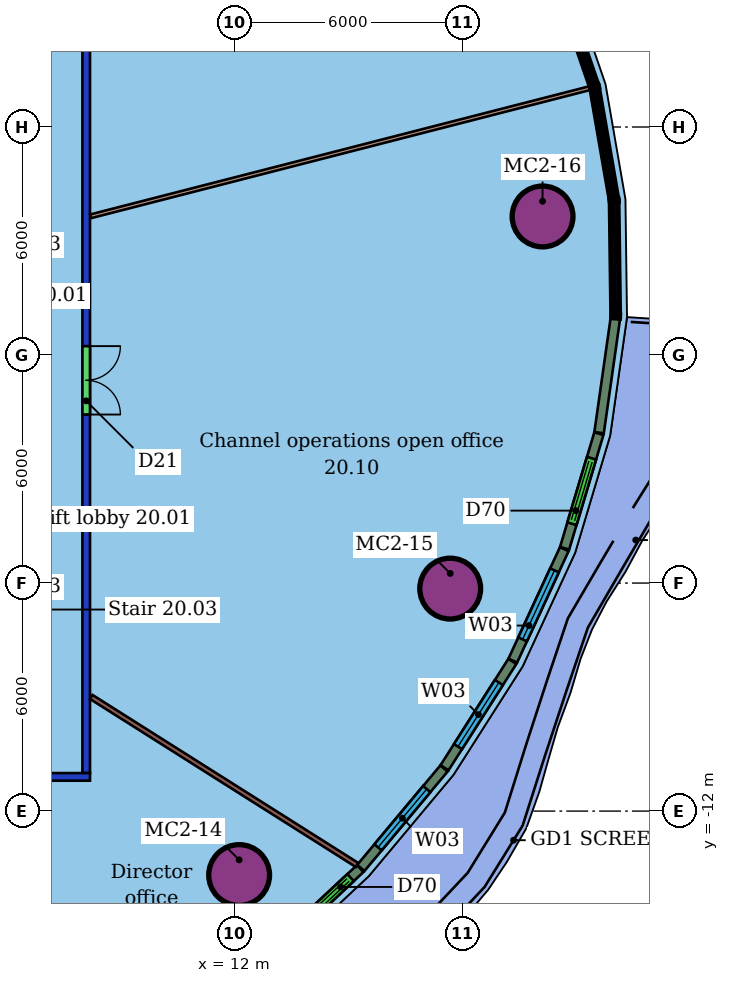
"""IFC4 building model, lengths in metres.
Left out: names, types, materials, properties, quantities, classifications, styles, units other than length and angle.
Written with IfcOpenShell. Run it as: python <this file> out.ifc"""

import sys

from ifc_helpers import new_model, si_unit, direction, frame, frame_2d, origin, origin_2d, place, context, subcontext, project, spatial, rectangle, hollow_circle, extrude, element, fill, save


model = new_model("IFC4")
c1 = context("Model", 3, precision=1e-05, world=origin(), true_north=direction((0.0, 1.0)))
c2 = subcontext(c1, "Body", "Model", "MODEL_VIEW")
j1 = project(units=[si_unit("LENGTHUNIT", "METRE"), si_unit("PLANEANGLEUNIT", "RADIAN")], contexts=[c1])
p1 = place(None, origin())
s1 = spatial("IfcSite", under=j1, at=p1, CompositionType="ELEMENT")
p2 = place(p1, origin())
s2 = spatial("IfcBuilding", under=s1, at=p2, CompositionType="ELEMENT")
p3 = place(p2, frame((0.0, 0.0, 92.2)))
s3 = spatial("IfcBuildingStorey", under=s2, at=p3, CompositionType="ELEMENT", Elevation=92.2)
for number, where, z_axis, x_axis in (
    (1, (12.125, -13.683, 0.0), (0.0, 0.0, 1.0), (1.0, 0.0, 0.0)),
    (2, (17.679, -6.146, 0.0), (0.0, 0.0, 1.0), (1.0, 0.0, 0.0)),
    (3, (20.109, 3.646, 0.0), (0.0, 0.0, 1.0), (1.0, 0.0, 0.0)),
):
    element("IfcColumn", number, at=place(p3, frame(where, z_axis=z_axis, x_axis=x_axis)), inside=s3, PredefinedType="COLUMN", context=c2, shape_type="SweptSolid", body=[
        extrude(hollow_circle(Radius=0.8, WallThickness=0.055, at=origin_2d()), origin(), (0.0, 0.0, 1.0), 3.45),
    ])
p4 = place(p3, frame((8.2, -11.1, 0.0), z_axis=(0.0, 0.0, 1.0), x_axis=(-1.0, 0.0, 0.0)))
e4 = element("IfcWall", 4, at=p4, inside=s3, PredefinedType="PARTITIONING", context=c2, shape_type="SweptSolid", body=[
    extrude(rectangle(XDim=28.4, YDim=0.2, at=frame_2d((14.2, 0.0))), origin(), (0.0, 0.0, 1.0), 3.0),
])
p5 = place(p4, frame((22.418, 0.0, 0.0)))
e5 = element("IfcOpeningElement", 5, at=p5, cuts=e4, PredefinedType="OPENING", context=c2, shape_type="SweptSolid", body=[
    extrude(rectangle(XDim=1.8, YDim=2.1, at=frame_2d((0.9, 1.05))), frame((0.0, 0.11, 0.0), z_axis=(0.0, -1.0, 0.0), x_axis=(1.0, 0.0, 0.0)), (0.0, 0.0, 1.0), 0.22),
])
p6 = place(p4, frame((16.796, 0.0, 0.0)))
e6 = element("IfcOpeningElement", 6, at=p6, cuts=e4, PredefinedType="OPENING", context=c2, shape_type="SweptSolid", body=[
    extrude(rectangle(XDim=1.0, YDim=2.1, at=frame_2d((0.5, 1.05))), frame((0.0, 0.11, 0.0), z_axis=(0.0, -1.0, 0.0), x_axis=(1.0, 0.0, 0.0)), (0.0, 0.0, 1.0), 0.22),
])
p7 = place(p4, frame((8.009, 0.0, 0.0)))
e7 = element("IfcOpeningElement", 7, at=p7, cuts=e4, PredefinedType="OPENING", context=c2, shape_type="SweptSolid", body=[
    extrude(rectangle(XDim=1.5, YDim=2.1, at=frame_2d((0.75, 1.05))), frame((0.0, 0.11, 0.0), z_axis=(0.0, -1.0, 0.0), x_axis=(1.0, 0.0, 0.0)), (0.0, 0.0, 1.0), 0.22),
])
p8 = place(p4, frame((2.173, 0.0, 0.0)))
e8 = element("IfcOpeningElement", 8, at=p8, cuts=e4, PredefinedType="OPENING", context=c2, shape_type="SweptSolid", body=[
    extrude(rectangle(XDim=1.0, YDim=2.4, at=frame_2d((0.5, 1.2))), frame((0.0, 0.11, 0.0), z_axis=(0.0, -1.0, 0.0), x_axis=(1.0, 0.0, 0.0)), (0.0, 0.0, 1.0), 0.22),
])
p9 = place(p3, frame((8.1, 11.0, 0.0), z_axis=(0.0, 0.0, 1.0), x_axis=(0.0, -1.0, 0.0)))
e9 = element("IfcWall", 9, at=p9, inside=s3, PredefinedType="PARTITIONING", context=c2, shape_type="SweptSolid", body=[
    extrude(rectangle(XDim=22.0, YDim=0.2, at=frame_2d((11.0, 0.0))), origin(), (0.0, 0.0, 1.0), 3.0),
])
p10 = place(p9, frame((10.766, 0.0, 0.0)))
e10 = element("IfcOpeningElement", 10, at=p10, cuts=e9, PredefinedType="OPENING", context=c2, shape_type="SweptSolid", body=[
    extrude(rectangle(XDim=1.8, YDim=2.1, at=frame_2d((0.9, 1.05))), frame((0.0, 0.11, 0.0), z_axis=(0.0, -1.0, 0.0), x_axis=(1.0, 0.0, 0.0)), (0.0, 0.0, 1.0), 0.22),
])
p11 = place(p3, frame((21.354, 7.023, 0.0), z_axis=(0.0, 0.0, 1.0), x_axis=(-0.968583888686, -0.248687053499, 0.0)))
e11 = element("IfcWall", 11, at=p11, inside=s3, PredefinedType="PARTITIONING", context=c2, shape_type="SweptSolid", body=[
    extrude(rectangle(XDim=13.567, YDim=0.1, at=frame_2d((6.784, 0.0))), origin(), (0.0, 0.0, 1.0), 3.45),
])
p12 = place(p3, frame((9.79, -17.936, 0.0), z_axis=(0.0, 0.0, 1.0), x_axis=(-0.660747590453, 0.750608167895, 0.0)))
e12 = element("IfcWall", 12, at=p12, inside=s3, PredefinedType="PARTITIONING", context=c2, shape_type="SweptSolid", body=[
    extrude(rectangle(XDim=8.919, YDim=0.125, at=frame_2d((4.46, 0.0))), origin(), (0.0, 0.0, 1.0), 3.45),
])
p13 = place(p3, frame((15.228, -13.418, 0.0), z_axis=(0.0, 0.0, 1.0), x_axis=(-0.845280625948, 0.534322621079, 0.0)))
e13 = element("IfcWall", 13, at=p13, inside=s3, PredefinedType="PARTITIONING", context=c2, shape_type="SweptSolid", body=[
    extrude(rectangle(XDim=8.275, YDim=0.125, at=frame_2d((4.138, 0.0))), origin(), (0.0, 0.0, 1.0), 3.45),
])
p14 = place(p3, frame((12.758, -15.901, 0.0), z_axis=(0.0, 0.0, 1.0), x_axis=(0.730116287539, 0.68332291537, 0.0)))
e14 = element("IfcWall", 14, at=p14, inside=s3, PredefinedType="SOLIDWALL", context=c2, shape_type="SweptSolid", body=[
    extrude(rectangle(XDim=3.496, YDim=0.25, at=frame_2d((1.748, 0.0))), origin(), (0.0, 0.0, 1.0), 3.05),
])
p15 = place(p14, frame((1.348, 0.0, 0.0)))
e15 = element("IfcOpeningElement", 15, at=p15, cuts=e14, PredefinedType="OPENING", context=c2, shape_type="SweptSolid", body=[
    extrude(rectangle(XDim=1.8, YDim=2.4, at=frame_2d((0.9, 1.2))), frame((0.0, 0.135, 0.0), z_axis=(0.0, -1.0, 0.0), x_axis=(1.0, 0.0, 0.0)), (0.0, 0.0, 1.0), 0.27),
])
p16 = place(p3, frame((15.326, -13.495, 0.0), z_axis=(0.0, 0.0, 1.0), x_axis=(0.641415804232, 0.767193434593, 0.0)))
e16 = element("IfcWall", 16, at=p16, inside=s3, PredefinedType="SOLIDWALL", context=c2, shape_type="SweptSolid", body=[
    extrude(rectangle(XDim=3.41, YDim=0.25, at=frame_2d((1.705, 0.0))), origin(), (0.0, 0.0, 1.0), 3.05),
])
p17 = place(p16, frame((0.705, 0.0, 0.9)))
e17 = element("IfcOpeningElement", 17, at=p17, cuts=e16, PredefinedType="OPENING", context=c2, shape_type="SweptSolid", body=[
    extrude(rectangle(XDim=2.0, YDim=2.1, at=frame_2d((1.0, 1.05))), frame((0.0, 0.135, 0.0), z_axis=(0.0, -1.0, 0.0), x_axis=(1.0, 0.0, 0.0)), (0.0, 0.0, 1.0), 0.27),
])
p18 = place(p3, frame((17.528, -10.86, 0.0), z_axis=(0.0, 0.0, 1.0), x_axis=(0.537922040575, 0.8429945897, 0.0)))
e18 = element("IfcWall", 18, at=p18, inside=s3, PredefinedType="SOLIDWALL", context=c2, shape_type="SweptSolid", body=[
    extrude(rectangle(XDim=3.32, YDim=0.25, at=frame_2d((1.66, 0.0))), origin(), (0.0, 0.0, 1.0), 3.05),
])
p19 = place(p18, frame((0.66, 0.0, 0.9)))
e19 = element("IfcOpeningElement", 19, at=p19, cuts=e18, PredefinedType="OPENING", context=c2, shape_type="SweptSolid", body=[
    extrude(rectangle(XDim=2.0, YDim=2.1, at=frame_2d((1.0, 1.05))), frame((0.0, 0.135, 0.0), z_axis=(0.0, -1.0, 0.0), x_axis=(1.0, 0.0, 0.0)), (0.0, 0.0, 1.0), 0.27),
])
p20 = place(p3, frame((19.326, -8.039, 0.0), z_axis=(0.0, 0.0, 1.0), x_axis=(0.41936019053, 0.907819932916, 0.0)))
e20 = element("IfcWall", 20, at=p20, inside=s3, PredefinedType="SOLIDWALL", context=c2, shape_type="SweptSolid", body=[
    extrude(rectangle(XDim=3.229, YDim=0.25, at=frame_2d((1.615, 0.0))), origin(), (0.0, 0.0, 1.0), 3.05),
])
p21 = place(p20, frame((0.615, 0.0, 0.9)))
e21 = element("IfcOpeningElement", 21, at=p21, cuts=e20, PredefinedType="OPENING", context=c2, shape_type="SweptSolid", body=[
    extrude(rectangle(XDim=2.0, YDim=2.1, at=frame_2d((1.0, 1.05))), frame((0.0, 0.135, 0.0), z_axis=(0.0, -1.0, 0.0), x_axis=(1.0, 0.0, 0.0)), (0.0, 0.0, 1.0), 0.27),
])
p22 = place(p3, frame((20.689, -5.083, 0.0), z_axis=(0.0, 0.0, 1.0), x_axis=(0.286322623224, 0.958133266008, 0.0)))
e22 = element("IfcWall", 22, at=p22, inside=s3, PredefinedType="SOLIDWALL", context=c2, shape_type="SweptSolid", body=[
    extrude(rectangle(XDim=3.146, YDim=0.25, at=frame_2d((1.573, 0.0))), origin(), (0.0, 0.0, 1.0), 3.05),
])
p23 = place(p22, frame((0.673, 0.0, 0.0)))
e23 = element("IfcOpeningElement", 23, at=p23, cuts=e22, PredefinedType="OPENING", context=c2, shape_type="SweptSolid", body=[
    extrude(rectangle(XDim=1.8, YDim=2.4, at=frame_2d((0.9, 1.2))), frame((0.0, 0.135, 0.0), z_axis=(0.0, -1.0, 0.0), x_axis=(1.0, 0.0, 0.0)), (0.0, 0.0, 1.0), 0.27),
])
p24 = place(p3, frame((21.596, -2.043, 0.0), z_axis=(0.0, 0.0, 1.0), x_axis=(0.140993456439, 0.990010527844, 0.0)))
e24 = element("IfcWall", 24, at=p24, inside=s3, PredefinedType="SOLIDWALL", context=c2, shape_type="SweptSolid", body=[
    extrude(rectangle(XDim=3.035, YDim=0.25, at=frame_2d((1.518, 0.0))), origin(), (0.0, 0.0, 1.0), 3.05),
])
p25 = place(p10, origin())
e25 = element("IfcDoor", 25, at=p25, inside=s3, OperationType="DOUBLE_DOOR_SINGLE_SWING", PredefinedType="DOOR", context=c2, shape_type="SweptSolid", body=[
    extrude(rectangle(XDim=1.8, YDim=2.1, at=frame_2d((0.9, 1.05))), frame((0.0, 0.025, 0.0), z_axis=(0.0, -1.0, 0.0), x_axis=(1.0, 0.0, 0.0)), (0.0, 0.0, 1.0), 0.05),
])
fill(e10, e25)
p26 = place(p15, origin())
e26 = element("IfcDoor", 26, at=p26, inside=s3, OperationType="DOUBLE_DOOR_SLIDING", PredefinedType="DOOR", context=c2, shape_type="SweptSolid", body=[
    extrude(rectangle(XDim=1.8, YDim=2.4, at=frame_2d((0.9, 1.2))), frame((0.0, 0.025, 0.0), z_axis=(0.0, -1.0, 0.0), x_axis=(1.0, 0.0, 0.0)), (0.0, 0.0, 1.0), 0.05),
])
fill(e15, e26)
p27 = place(p17, origin())
e27 = element("IfcWindow", 27, at=p27, inside=s3, PartitioningType="SINGLE_PANEL", PredefinedType="WINDOW", context=c2, shape_type="SweptSolid", body=[
    extrude(rectangle(XDim=2.0, YDim=2.1, at=frame_2d((1.0, 1.05))), frame((0.0, 0.03, 0.0), z_axis=(0.0, -1.0, 0.0), x_axis=(1.0, 0.0, 0.0)), (0.0, 0.0, 1.0), 0.06),
])
fill(e17, e27)
p28 = place(p19, origin())
e28 = element("IfcWindow", 28, at=p28, inside=s3, PartitioningType="SINGLE_PANEL", PredefinedType="WINDOW", context=c2, shape_type="SweptSolid", body=[
    extrude(rectangle(XDim=2.0, YDim=2.1, at=frame_2d((1.0, 1.05))), frame((0.0, 0.03, 0.0), z_axis=(0.0, -1.0, 0.0), x_axis=(1.0, 0.0, 0.0)), (0.0, 0.0, 1.0), 0.06),
])
fill(e19, e28)
p29 = place(p21, origin())
e29 = element("IfcWindow", 29, at=p29, inside=s3, PartitioningType="SINGLE_PANEL", PredefinedType="WINDOW", context=c2, shape_type="SweptSolid", body=[
    extrude(rectangle(XDim=2.0, YDim=2.1, at=frame_2d((1.0, 1.05))), frame((0.0, 0.03, 0.0), z_axis=(0.0, -1.0, 0.0), x_axis=(1.0, 0.0, 0.0)), (0.0, 0.0, 1.0), 0.06),
])
fill(e21, e29)
p30 = place(p23, origin())
e30 = element("IfcDoor", 30, at=p30, inside=s3, OperationType="DOUBLE_DOOR_SLIDING", PredefinedType="DOOR", context=c2, shape_type="SweptSolid", body=[
    extrude(rectangle(XDim=1.8, YDim=2.4, at=frame_2d((0.9, 1.2))), frame((0.0, 0.025, 0.0), z_axis=(0.0, -1.0, 0.0), x_axis=(1.0, 0.0, 0.0)), (0.0, 0.0, 1.0), 0.05),
])
fill(e23, e30)
save(model, sys.argv[1])
